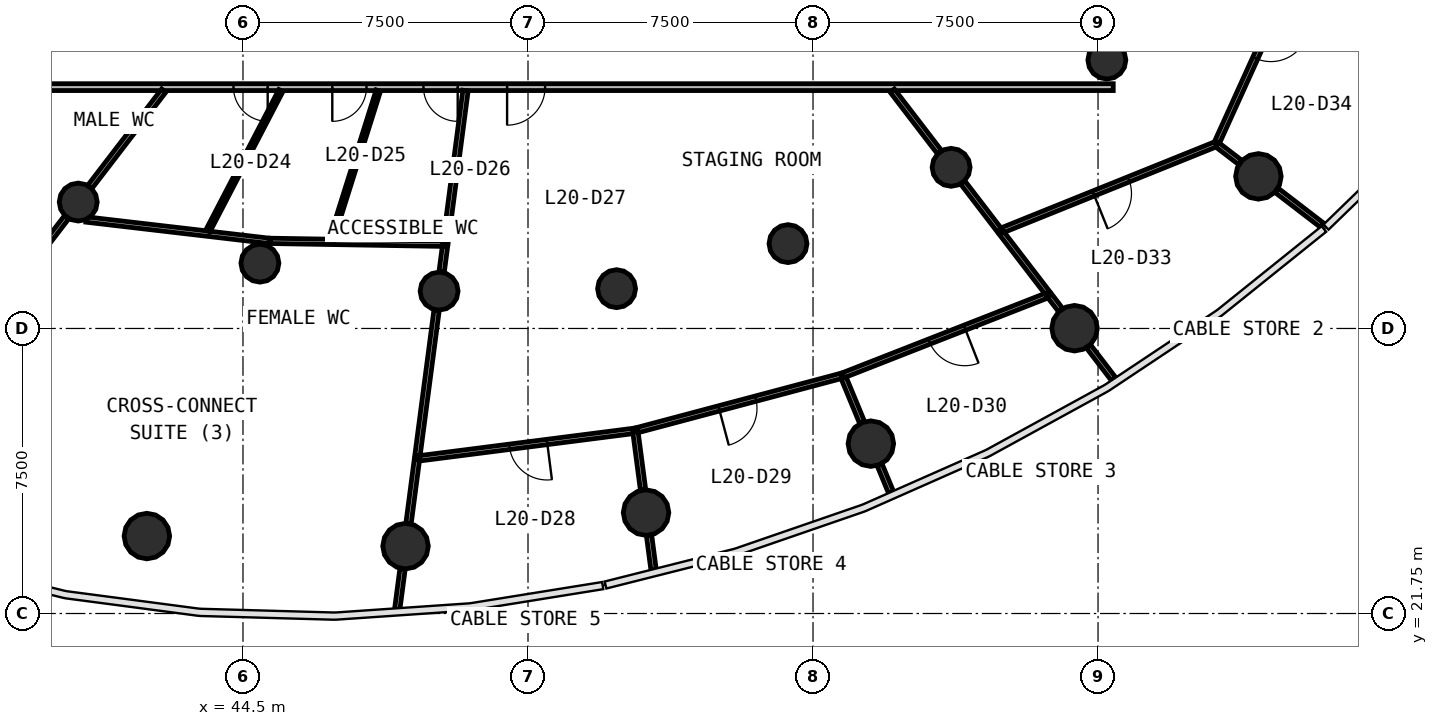
"""IFC4 building model, lengths in metres.
Left out: names, types, materials, properties, quantities, classifications, styles, units other than length and angle.
Written with IfcOpenShell. Run it as: python <this file> out.ifc"""

import sys

from ifc_helpers import new_model, si_unit, direction, frame, frame_2d, origin, origin_2d, place, context, subcontext, project, spatial, rectangle, circle, extrude, source, transform, mapped, element, fill, save


model = new_model("IFC4")
c1 = context("Model", 3, precision=1e-05, world=origin(), true_north=direction((0.0, 1.0)))
c2 = subcontext(c1, "Body", "Model", "MODEL_VIEW")
j1 = project(units=[si_unit("LENGTHUNIT", "METRE"), si_unit("PLANEANGLEUNIT", "RADIAN")], contexts=[c1])
p1 = place(None, origin())
s1 = spatial("IfcSite", under=j1, at=p1, CompositionType="ELEMENT")
p2 = place(p1, origin())
s2 = spatial("IfcBuilding", under=s1, at=p2, CompositionType="ELEMENT")
p3 = place(p2, frame((0.0, 0.0, 88.0)))
s3 = spatial("IfcBuildingStorey", under=s2, at=p3, CompositionType="ELEMENT", Elevation=88.0)
m1 = source(origin(), c2, "Body", "SweptSolid", [
    extrude(circle(Radius=0.6, at=origin_2d()), origin(), (0.0, 0.0, 1.0), 4.1),
])
for number, where, z_axis, x_axis in (
    (1, (41.971, 23.788, 0.0), (0.0, 0.0, 1.0), (1.0, 0.0, 0.0)),
    (2, (48.778, 23.523, 0.0), (0.0, 0.0, 1.0), (1.0, 0.0, 0.0)),
    (3, (55.106, 24.405, 0.0), (0.0, 0.0, 1.0), (1.0, 0.0, 0.0)),
    (4, (61.022, 26.219, 0.0), (0.0, 0.0, 1.0), (1.0, 0.0, 0.0)),
    (5, (66.382, 29.257, 0.0), (0.0, 0.0, 1.0), (1.0, 0.0, 0.0)),
    (6, (71.22, 33.252, 0.0), (0.0, 0.0, 1.0), (1.0, 0.0, 0.0)),
):
    element("IfcColumn", number, at=place(p3, frame(where, z_axis=z_axis, x_axis=x_axis)), inside=s3, PredefinedType="COLUMN", context=c2, shape_type="MappedRepresentation", body=[
        mapped(m1, transform((0.0, 0.0, 0.0), scale=1.0)),
    ])
m2 = source(origin(), c2, "Body", "SweptSolid", [
    extrude(circle(Radius=0.5, at=origin_2d()), origin(), (0.0, 0.0, 1.0), 4.1),
])
for number, where, z_axis, x_axis in (
    (7, (40.165, 32.576, 0.0), (0.0, 0.0, 1.0), (1.0, 0.0, 0.0)),
    (8, (44.945, 30.969, 0.0), (0.0, 0.0, 1.0), (1.0, 0.0, 0.0)),
    (9, (49.661, 30.233, 0.0), (0.0, 0.0, 1.0), (1.0, 0.0, 0.0)),
    (10, (54.331, 30.297, 0.0), (0.0, 0.0, 1.0), (1.0, 0.0, 0.0)),
    (11, (58.842, 31.482, 0.0), (0.0, 0.0, 1.0), (1.0, 0.0, 0.0)),
    (12, (63.134, 33.49, 0.0), (0.0, 0.0, 1.0), (1.0, 0.0, 0.0)),
    (13, (67.232, 36.312, 0.0), (0.0, 0.0, 1.0), (1.0, 0.0, 0.0)),
):
    element("IfcColumn", number, at=place(p3, frame(where, z_axis=z_axis, x_axis=x_axis)), inside=s3, PredefinedType="COLUMN", context=c2, shape_type="MappedRepresentation", body=[
        mapped(m2, transform((0.0, 0.0, 0.0), scale=1.0)),
    ])
p4 = place(p3, frame((67.4, 35.6, 0.0), z_axis=(0.0, 0.0, 1.0), x_axis=(-1.0, 0.0, 0.0)))
e14 = element("IfcWall", 14, at=p4, inside=s3, PredefinedType="PARTITIONING", context=c2, shape_type="SweptSolid", body=[
    extrude(rectangle(XDim=30.8, YDim=0.18, at=frame_2d((15.4, 0.0))), origin(), (0.0, 0.0, 1.0), 2.9),
])
p5 = place(p4, frame((22.25, 0.0, 0.0)))
e15 = element("IfcOpeningElement", 15, at=p5, cuts=e14, PredefinedType="OPENING", context=c2, shape_type="SweptSolid", body=[
    extrude(rectangle(XDim=0.9, YDim=2.1, at=frame_2d((0.45, 1.05))), frame((0.0, 0.1, 0.0), z_axis=(0.0, -1.0, 0.0), x_axis=(1.0, 0.0, 0.0)), (0.0, 0.0, 1.0), 0.2),
])
p6 = place(p4, frame((19.65, 0.0, 0.0)))
e16 = element("IfcOpeningElement", 16, at=p6, cuts=e14, PredefinedType="OPENING", context=c2, shape_type="SweptSolid", body=[
    extrude(rectangle(XDim=0.9, YDim=2.1, at=frame_2d((0.45, 1.05))), frame((0.0, 0.1, 0.0), z_axis=(0.0, -1.0, 0.0), x_axis=(1.0, 0.0, 0.0)), (0.0, 0.0, 1.0), 0.2),
])
p7 = place(p4, frame((17.25, 0.0, 0.0)))
e17 = element("IfcOpeningElement", 17, at=p7, cuts=e14, PredefinedType="OPENING", context=c2, shape_type="SweptSolid", body=[
    extrude(rectangle(XDim=0.9, YDim=2.1, at=frame_2d((0.45, 1.05))), frame((0.0, 0.1, 0.0), z_axis=(0.0, -1.0, 0.0), x_axis=(1.0, 0.0, 0.0)), (0.0, 0.0, 1.0), 0.2),
])
p8 = place(p4, frame((14.95, 0.0, 0.0)))
e18 = element("IfcOpeningElement", 18, at=p8, cuts=e14, PredefinedType="OPENING", context=c2, shape_type="SweptSolid", body=[
    extrude(rectangle(XDim=1.0, YDim=2.1, at=frame_2d((0.5, 1.05))), frame((0.0, 0.1, 0.0), z_axis=(0.0, -1.0, 0.0), x_axis=(1.0, 0.0, 0.0)), (0.0, 0.0, 1.0), 0.2),
])
p9 = place(p3, frame((70.111, 34.103, 0.0), z_axis=(0.0, 0.0, 1.0), x_axis=(-0.927526515491, -0.373757358538, 0.0)))
e19 = element("IfcWall", 19, at=p9, inside=s3, PredefinedType="PARTITIONING", context=c2, shape_type="SweptSolid", body=[
    extrude(rectangle(XDim=6.133, YDim=0.14, at=frame_2d((3.066, 0.0))), origin(), (0.0, 0.0, 1.0), 2.9),
])
p10 = place(p9, frame((2.483, 0.0, 0.0)))
e20 = element("IfcOpeningElement", 20, at=p10, cuts=e19, PredefinedType="OPENING", context=c2, shape_type="SweptSolid", body=[
    extrude(rectangle(XDim=1.0, YDim=2.1, at=frame_2d((0.5, 1.05))), frame((0.0, 0.08, 0.0), z_axis=(0.0, -1.0, 0.0), x_axis=(1.0, 0.0, 0.0)), (0.0, 0.0, 1.0), 0.16),
])
p11 = place(p3, frame((72.555, 39.486, 0.0), z_axis=(0.0, 0.0, 1.0), x_axis=(-0.413427624121, -0.91053698421, 0.0)))
e21 = element("IfcWall", 21, at=p11, inside=s3, PredefinedType="PARTITIONING", context=c2, shape_type="SweptSolid", body=[
    extrude(rectangle(XDim=5.882, YDim=0.14, at=frame_2d((2.941, 0.0))), origin(), (0.0, 0.0, 1.0), 2.9),
])
p12 = place(p11, frame((2.432, 0.0, 0.0)))
e22 = element("IfcOpeningElement", 22, at=p12, cuts=e21, PredefinedType="OPENING", context=c2, shape_type="SweptSolid", body=[
    extrude(rectangle(XDim=1.0, YDim=2.1, at=frame_2d((0.5, 1.05))), frame((0.0, 0.08, 0.0), z_axis=(0.0, -1.0, 0.0), x_axis=(1.0, 0.0, 0.0)), (0.0, 0.0, 1.0), 0.16),
])
p13 = place(p3, frame((65.706, 30.137, 0.0), z_axis=(0.0, 0.0, 1.0), x_axis=(-0.931147570947, -0.364642566247, 0.0)))
e23 = element("IfcWall", 23, at=p13, inside=s3, PredefinedType="PARTITIONING", context=c2, shape_type="SweptSolid", body=[
    extrude(rectangle(XDim=5.828, YDim=0.14, at=frame_2d((2.914, 0.0))), origin(), (0.0, 0.0, 1.0), 2.9),
])
p14 = place(p13, frame((2.378, 0.0, 0.0)))
e24 = element("IfcOpeningElement", 24, at=p14, cuts=e23, PredefinedType="OPENING", context=c2, shape_type="SweptSolid", body=[
    extrude(rectangle(XDim=1.0, YDim=2.1, at=frame_2d((0.5, 1.05))), frame((0.0, 0.08, 0.0), z_axis=(0.0, -1.0, 0.0), x_axis=(1.0, 0.0, 0.0)), (0.0, 0.0, 1.0), 0.16),
])
p15 = place(p3, frame((54.823, 26.56, 0.0), z_axis=(0.0, 0.0, 1.0), x_axis=(-0.99190429121, -0.126987704445, 0.0)))
e25 = element("IfcWall", 25, at=p15, inside=s3, PredefinedType="PARTITIONING", context=c2, shape_type="SweptSolid", body=[
    extrude(rectangle(XDim=5.789, YDim=0.14, at=frame_2d((2.895, 0.0))), origin(), (0.0, 0.0, 1.0), 2.9),
])
p16 = place(p15, frame((2.339, 0.0, 0.0)))
e26 = element("IfcOpeningElement", 26, at=p16, cuts=e25, PredefinedType="OPENING", context=c2, shape_type="SweptSolid", body=[
    extrude(rectangle(XDim=1.0, YDim=2.1, at=frame_2d((0.5, 1.05))), frame((0.0, 0.08, 0.0), z_axis=(0.0, -1.0, 0.0), x_axis=(1.0, 0.0, 0.0)), (0.0, 0.0, 1.0), 0.16),
])
p17 = place(p3, frame((60.25, 28.004, 0.0), z_axis=(0.0, 0.0, 1.0), x_axis=(-0.966384922243, -0.257099556711, 0.0)))
e27 = element("IfcWall", 27, at=p17, inside=s3, PredefinedType="PARTITIONING", context=c2, shape_type="SweptSolid", body=[
    extrude(rectangle(XDim=5.586, YDim=0.14, at=frame_2d((2.793, 0.0))), origin(), (0.0, 0.0, 1.0), 2.9),
])
p18 = place(p17, frame((2.336, 0.0, 0.0)))
e28 = element("IfcOpeningElement", 28, at=p18, cuts=e27, PredefinedType="OPENING", context=c2, shape_type="SweptSolid", body=[
    extrude(rectangle(XDim=1.0, YDim=2.1, at=frame_2d((0.5, 1.05))), frame((0.0, 0.08, 0.0), z_axis=(0.0, -1.0, 0.0), x_axis=(1.0, 0.0, 0.0)), (0.0, 0.0, 1.0), 0.16),
])
p19 = place(p3, frame((40.374, 32.117, 0.0), z_axis=(0.0, 0.0, 1.0), x_axis=(0.993268355234, -0.115835980988, 0.0)))
e29 = element("IfcWall", 29, at=p19, inside=s3, PredefinedType="PARTITIONING", context=c2, shape_type="SweptSolid", body=[
    extrude(rectangle(XDim=4.848, YDim=0.14, at=frame_2d((2.424, 0.0))), origin(), (0.0, 0.0, 1.0), 2.9),
])
p20 = place(p3, frame((45.219, 31.555, 0.0), z_axis=(0.0, 0.0, 1.0), x_axis=(0.999861551783, -0.016639629386, 0.0)))
e30 = element("IfcWall", 30, at=p20, inside=s3, PredefinedType="PARTITIONING", context=c2, shape_type="SweptSolid", body=[
    extrude(rectangle(XDim=4.607, YDim=0.14, at=frame_2d((2.304, 0.0))), origin(), (0.0, 0.0, 1.0), 2.9),
])
p21 = place(p3, frame((50.356, 35.51, 0.0), z_axis=(0.0, 0.0, 1.0), x_axis=(-0.130531181342, -0.991444204531, 0.0)))
e31 = element("IfcWall", 31, at=p21, inside=s3, PredefinedType="PARTITIONING", context=c2, shape_type="SweptSolid", body=[
    extrude(rectangle(XDim=4.036, YDim=0.14, at=frame_2d((2.018, 0.0))), origin(), (0.0, 0.0, 1.0), 2.9),
])
p22 = place(p3, frame((49.595, 29.733, 0.0), z_axis=(0.0, 0.0, 1.0), x_axis=(-0.130510017613, -0.991446990667, 0.0)))
e32 = element("IfcWall", 32, at=p22, inside=s3, PredefinedType="PARTITIONING", context=c2, shape_type="SweptSolid", body=[
    extrude(rectangle(XDim=3.869, YDim=0.14, at=frame_2d((1.934, 0.0))), origin(), (0.0, 0.0, 1.0), 2.9),
])
p23 = place(p3, frame((42.416, 35.51, 0.0), z_axis=(0.0, 0.0, 1.0), x_axis=(-0.60874605662, -0.793365135703, 0.0)))
e33 = element("IfcWall", 33, at=p23, inside=s3, PredefinedType="PARTITIONING", context=c2, shape_type="SweptSolid", body=[
    extrude(rectangle(XDim=3.194, YDim=0.14, at=frame_2d((1.597, 0.0))), origin(), (0.0, 0.0, 1.0), 2.9),
])
p24 = place(p3, frame((61.584, 35.51, 0.0), z_axis=(0.0, 0.0, 1.0), x_axis=(0.608727763541, -0.793379171578, 0.0)))
e34 = element("IfcWall", 34, at=p24, inside=s3, PredefinedType="PARTITIONING", context=c2, shape_type="SweptSolid", body=[
    extrude(rectangle(XDim=2.042, YDim=0.14, at=frame_2d((1.021, 0.0))), origin(), (0.0, 0.0, 1.0), 2.9),
])
p25 = place(p3, frame((64.467, 31.753, 0.0), z_axis=(0.0, 0.0, 1.0), x_axis=(0.608736894437, -0.793372165728, 0.0)))
e35 = element("IfcWall", 35, at=p25, inside=s3, PredefinedType="PARTITIONING", context=c2, shape_type="SweptSolid", body=[
    extrude(rectangle(XDim=1.964, YDim=0.14, at=frame_2d((0.982, 0.0))), origin(), (0.0, 0.0, 1.0), 2.9),
])
p26 = place(p3, frame((49.077, 25.796, 0.0), z_axis=(0.0, 0.0, 1.0), x_axis=(-0.130476963779, -0.991451341178, 0.0)))
e36 = element("IfcWall", 36, at=p26, inside=s3, PredefinedType="PARTITIONING", context=c2, shape_type="SweptSolid", body=[
    extrude(rectangle(XDim=1.688, YDim=0.14, at=frame_2d((0.844, 0.0))), origin(), (0.0, 0.0, 1.0), 2.9),
])
p27 = place(p3, frame((63.441, 33.09, 0.0), z_axis=(0.0, 0.0, 1.0), x_axis=(0.608800720532, -0.793323189299, 0.0)))
e37 = element("IfcWall", 37, at=p27, inside=s3, PredefinedType="PARTITIONING", context=c2, shape_type="SweptSolid", body=[
    extrude(rectangle(XDim=1.583, YDim=0.14, at=frame_2d((0.791, 0.0))), origin(), (0.0, 0.0, 1.0), 2.9),
])
p28 = place(p3, frame((54.826, 26.531, 0.0), z_axis=(0.0, 0.0, 1.0), x_axis=(0.13064727716, -0.991428912717, 0.0)))
e38 = element("IfcWall", 38, at=p28, inside=s3, PredefinedType="PARTITIONING", context=c2, shape_type="SweptSolid", body=[
    extrude(rectangle(XDim=1.54, YDim=0.14, at=frame_2d((0.77, 0.0))), origin(), (0.0, 0.0, 1.0), 2.9),
])
p29 = place(p3, frame((71.699, 32.884, 0.0), z_axis=(0.0, 0.0, 1.0), x_axis=(0.793329378559, -0.608792655273, 0.0)))
e39 = element("IfcWall", 39, at=p29, inside=s3, PredefinedType="PARTITIONING", context=c2, shape_type="SweptSolid", body=[
    extrude(rectangle(XDim=1.504, YDim=0.14, at=frame_2d((0.752, 0.0))), origin(), (0.0, 0.0, 1.0), 2.9),
])
p30 = place(p3, frame((60.306, 27.948, 0.0), z_axis=(0.0, 0.0, 1.0), x_axis=(0.382737975599, -0.923856938078, 0.0)))
e40 = element("IfcWall", 40, at=p30, inside=s3, PredefinedType="PARTITIONING", context=c2, shape_type="SweptSolid", body=[
    extrude(rectangle(XDim=1.266, YDim=0.14, at=frame_2d((0.633, 0.0))), origin(), (0.0, 0.0, 1.0), 2.9),
])
p31 = place(p3, frame((66.75, 28.778, 0.0), z_axis=(0.0, 0.0, 1.0), x_axis=(0.608735888805, -0.793372937326, 0.0)))
e41 = element("IfcWall", 41, at=p31, inside=s3, PredefinedType="PARTITIONING", context=c2, shape_type="SweptSolid", body=[
    extrude(rectangle(XDim=1.078, YDim=0.14, at=frame_2d((0.539, 0.0))), origin(), (0.0, 0.0, 1.0), 2.9),
])
p32 = place(p3, frame((48.699, 22.924, 0.0), z_axis=(0.0, 0.0, 1.0), x_axis=(-0.130596008599, -0.991435667372, 0.0)))
e42 = element("IfcWall", 42, at=p32, inside=s3, PredefinedType="PARTITIONING", context=c2, shape_type="SweptSolid", body=[
    extrude(rectangle(XDim=1.071, YDim=0.14, at=frame_2d((0.536, 0.0))), origin(), (0.0, 0.0, 1.0), 2.9),
])
p33 = place(p3, frame((39.858, 32.176, 0.0), z_axis=(0.0, 0.0, 1.0), x_axis=(-0.608777438842, -0.793341055258, 0.0)))
e43 = element("IfcWall", 43, at=p33, inside=s3, PredefinedType="PARTITIONING", context=c2, shape_type="SweptSolid", body=[
    extrude(rectangle(XDim=1.037, YDim=0.14, at=frame_2d((0.519, 0.0))), origin(), (0.0, 0.0, 1.0), 2.9),
])
p34 = place(p3, frame((55.185, 23.805, 0.0), z_axis=(0.0, 0.0, 1.0), x_axis=(0.130578341009, -0.99143799446, 0.0)))
e44 = element("IfcWall", 44, at=p34, inside=s3, PredefinedType="PARTITIONING", context=c2, shape_type="SweptSolid", body=[
    extrude(rectangle(XDim=0.918, YDim=0.14, at=frame_2d((0.459, 0.0))), origin(), (0.0, 0.0, 1.0), 2.9),
])
p35 = place(p3, frame((70.135, 34.085, 0.0), z_axis=(0.0, 0.0, 1.0), x_axis=(0.793348849006, -0.608767282121, 0.0)))
e45 = element("IfcWall", 45, at=p35, inside=s3, PredefinedType="PARTITIONING", context=c2, shape_type="SweptSolid", body=[
    extrude(rectangle(XDim=0.763, YDim=0.14, at=frame_2d((0.382, 0.0))), origin(), (0.0, 0.0, 1.0), 2.9),
])
p36 = place(p3, frame((61.253, 25.66, 0.0), z_axis=(0.0, 0.0, 1.0), x_axis=(0.382846589746, -0.923811933631, 0.0)))
e46 = element("IfcWall", 46, at=p36, inside=s3, PredefinedType="PARTITIONING", context=c2, shape_type="SweptSolid", body=[
    extrude(rectangle(XDim=0.784, YDim=0.14, at=frame_2d((0.392, 0.0))), origin(), (0.0, 0.0, 1.0), 2.9),
])
p37 = place(p3, frame((49.816, 31.409, 0.0), z_axis=(0.0, 0.0, 1.0), x_axis=(-0.130380387554, -0.991464046015, 0.0)))
e47 = element("IfcWall", 47, at=p37, inside=s3, PredefinedType="PARTITIONING", context=c2, shape_type="SweptSolid", body=[
    extrude(rectangle(XDim=0.682, YDim=0.14, at=frame_2d((0.341, 0.0))), origin(), (0.0, 0.0, 1.0), 2.9),
])
p38 = place(p3, frame((65.725, 30.114, 0.0), z_axis=(0.0, 0.0, 1.0), x_axis=(0.608916466685, -0.793234351626, 0.0)))
e48 = element("IfcWall", 48, at=p38, inside=s3, PredefinedType="PARTITIONING", context=c2, shape_type="SweptSolid", body=[
    extrude(rectangle(XDim=0.476, YDim=0.14, at=frame_2d((0.238, 0.0))), origin(), (0.0, 0.0, 1.0), 2.9),
])
p39 = place(p3, frame((45.498, 35.51, 0.0), z_axis=(0.0, 0.0, 1.0), x_axis=(-0.461756753262, -0.887006595701, 0.0)))
e49 = element("IfcWall", 49, at=p39, inside=s3, PredefinedType="PARTITIONING", context=c2, shape_type="SweptSolid", body=[
    extrude(rectangle(XDim=4.166, YDim=0.12, at=frame_2d((2.083, 0.0))), origin(), (0.0, 0.0, 1.0), 2.9),
])
p40 = place(p3, frame((48.062, 35.51, 0.0), z_axis=(0.0, 0.0, 1.0), x_axis=(-0.300721111257, -0.953712122836, 0.0)))
e50 = element("IfcWall", 50, at=p40, inside=s3, PredefinedType="PARTITIONING", context=c2, shape_type="SweptSolid", body=[
    extrude(rectangle(XDim=4.102, YDim=0.12, at=frame_2d((2.051, 0.0))), origin(), (0.0, 0.0, 1.0), 2.9),
])
m3 = source(origin(), c2, "Body", "SweptSolid", [
    extrude(rectangle(XDim=0.9, YDim=2.1, at=frame_2d((0.45, 1.05))), frame((0.0, 0.025, 0.0), z_axis=(0.0, -1.0, 0.0), x_axis=(1.0, 0.0, 0.0)), (0.0, 0.0, 1.0), 0.05),
])
p41 = place(p5, origin())
e51 = element("IfcDoor", 51, at=p41, inside=s3, OperationType="SINGLE_SWING_LEFT", PredefinedType="DOOR", context=c2, shape_type="MappedRepresentation", body=[
    mapped(m3, transform((0.0, 0.0, 0.0), scale=1.0)),
])
fill(e15, e51)
p42 = place(p6, origin())
e52 = element("IfcDoor", 52, at=p42, inside=s3, OperationType="SINGLE_SWING_RIGHT", PredefinedType="DOOR", context=c2, shape_type="MappedRepresentation", body=[
    mapped(m3, transform((0.0, 0.0, 0.0), scale=1.0)),
])
fill(e16, e52)
p43 = place(p7, origin())
e53 = element("IfcDoor", 53, at=p43, inside=s3, OperationType="SINGLE_SWING_LEFT", PredefinedType="DOOR", context=c2, shape_type="MappedRepresentation", body=[
    mapped(m3, transform((0.0, 0.0, 0.0), scale=1.0)),
])
fill(e17, e53)
m4 = source(origin(), c2, "Body", "SweptSolid", [
    extrude(rectangle(XDim=1.0, YDim=2.1, at=frame_2d((0.5, 1.05))), frame((0.0, 0.025, 0.0), z_axis=(0.0, -1.0, 0.0), x_axis=(1.0, 0.0, 0.0)), (0.0, 0.0, 1.0), 0.05),
])
p44 = place(p8, origin())
e54 = element("IfcDoor", 54, at=p44, inside=s3, OperationType="SINGLE_SWING_RIGHT", PredefinedType="DOOR", context=c2, shape_type="MappedRepresentation", body=[
    mapped(m4, transform((0.0, 0.0, 0.0), scale=1.0)),
])
fill(e18, e54)
p45 = place(p16, origin())
e55 = element("IfcDoor", 55, at=p45, inside=s3, OperationType="SINGLE_SWING_LEFT", PredefinedType="DOOR", context=c2, shape_type="MappedRepresentation", body=[
    mapped(m4, transform((0.0, 0.0, 0.0), scale=1.0)),
])
fill(e26, e55)
p46 = place(p18, origin())
e56 = element("IfcDoor", 56, at=p46, inside=s3, OperationType="SINGLE_SWING_RIGHT", PredefinedType="DOOR", context=c2, shape_type="MappedRepresentation", body=[
    mapped(m4, transform((0.0, 0.0, 0.0), scale=1.0)),
])
fill(e28, e56)
p47 = place(p14, origin())
e57 = element("IfcDoor", 57, at=p47, inside=s3, OperationType="SINGLE_SWING_LEFT", PredefinedType="DOOR", context=c2, shape_type="MappedRepresentation", body=[
    mapped(m4, transform((0.0, 0.0, 0.0), scale=1.0)),
])
fill(e24, e57)
p48 = place(p10, origin())
e58 = element("IfcDoor", 58, at=p48, inside=s3, OperationType="SINGLE_SWING_RIGHT", PredefinedType="DOOR", context=c2, shape_type="MappedRepresentation", body=[
    mapped(m4, transform((0.0, 0.0, 0.0), scale=1.0)),
])
fill(e20, e58)
p49 = place(p12, origin())
e59 = element("IfcDoor", 59, at=p49, inside=s3, OperationType="SINGLE_SWING_LEFT", PredefinedType="DOOR", context=c2, shape_type="MappedRepresentation", body=[
    mapped(m4, transform((0.0, 0.0, 0.0), scale=1.0)),
])
fill(e22, e59)
save(model, sys.argv[1])
